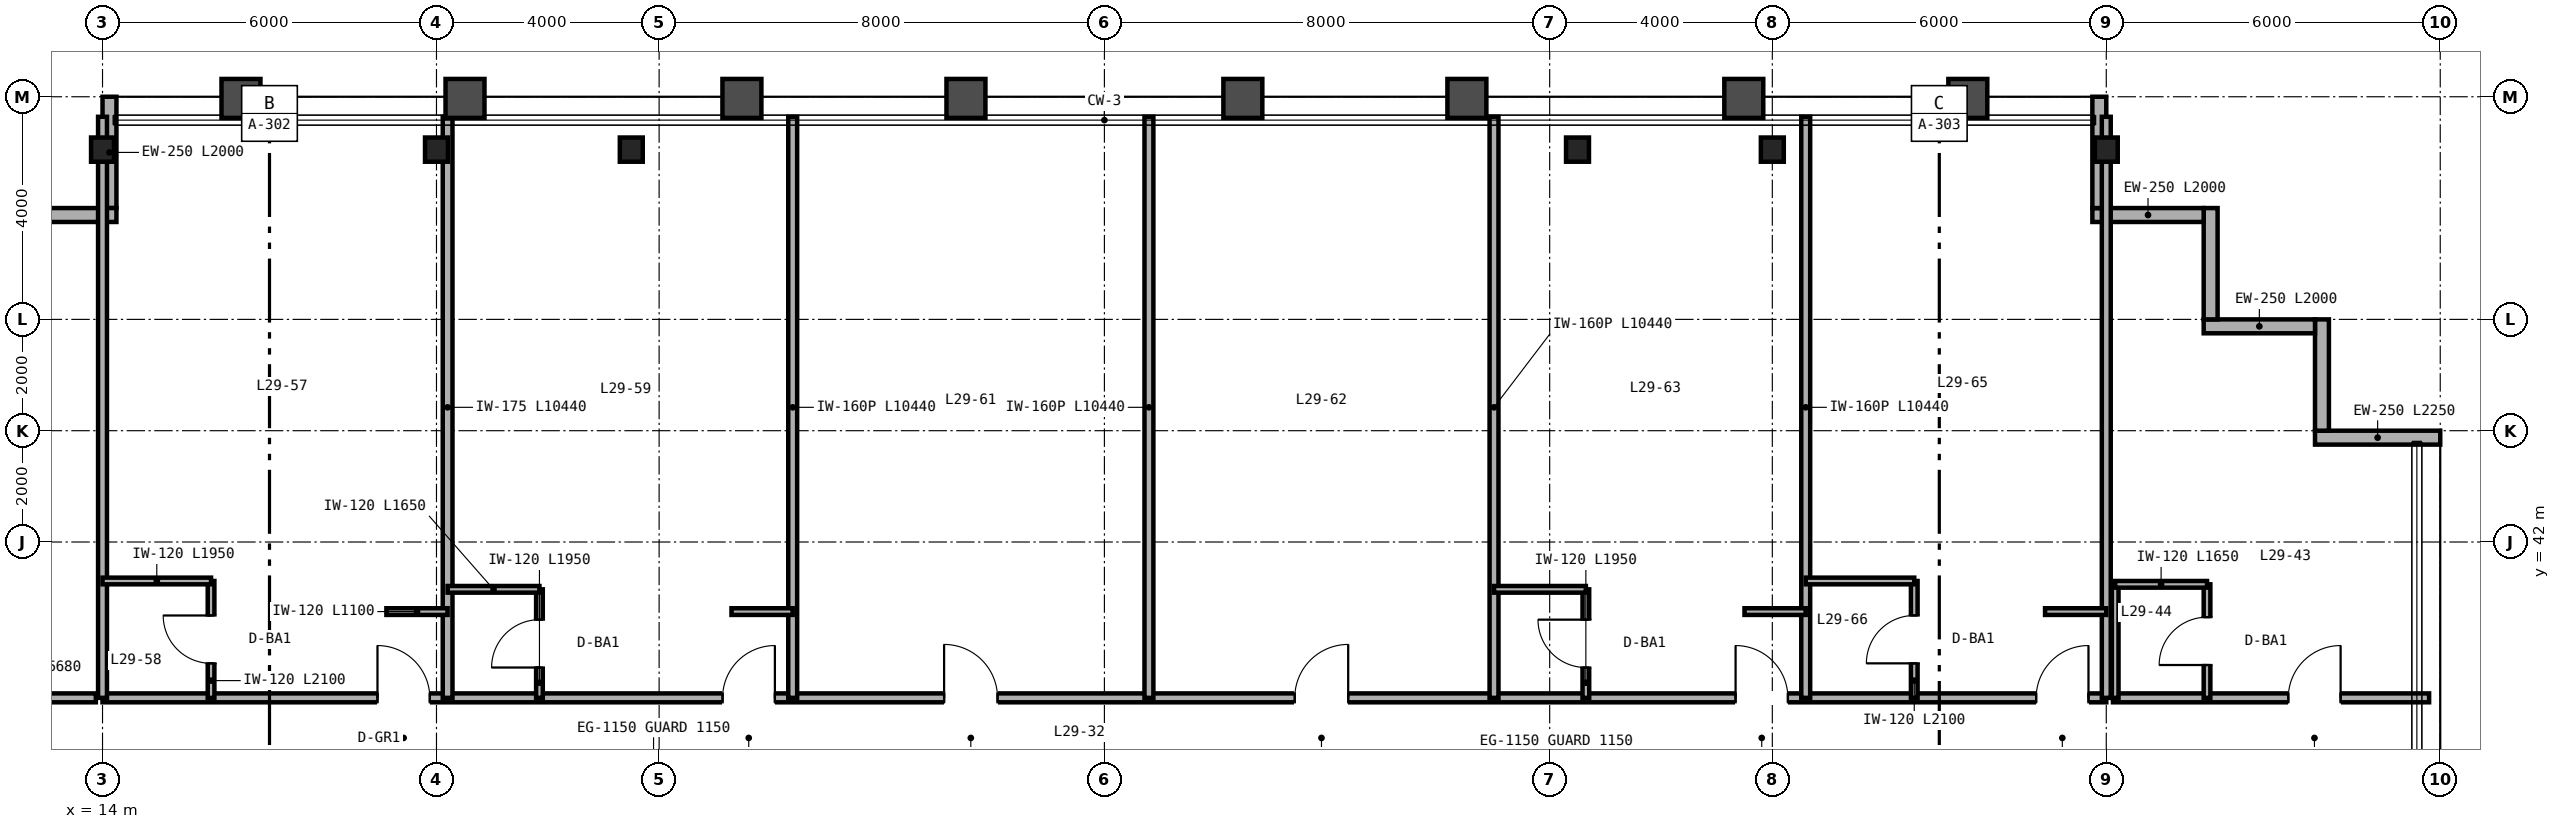
"""IFC4 building model, lengths in metres.
Left out: names, types, materials, properties, quantities, classifications, styles, units other than length and angle.
Written with IfcOpenShell. Run it as: python <this file> out.ifc"""

import sys

from ifc_helpers import new_model, si_unit, direction, frame, frame_2d, origin, origin_2d, place, context, subcontext, project, spatial, rectangle, i_section, extrude, source, transform, mapped, element, fill, save


model = new_model("IFC4")
c1 = context("Model", 3, precision=1e-05, world=origin(), true_north=direction((0.0, 1.0)))
c2 = subcontext(c1, "Body", "Model", "MODEL_VIEW")
j1 = project(units=[si_unit("LENGTHUNIT", "METRE"), si_unit("PLANEANGLEUNIT", "RADIAN")], contexts=[c1])
p1 = place(None, origin())
s1 = spatial("IfcSite", under=j1, at=p1, CompositionType="ELEMENT")
p2 = place(p1, origin())
s2 = spatial("IfcBuilding", under=s1, at=p2, CompositionType="ELEMENT")
p3 = place(p2, frame((0.0, 0.0, 118.8)))
s3 = spatial("IfcBuildingStorey", under=s2, at=p3, CompositionType="ELEMENT", Elevation=118.8)
m1 = source(origin(), c2, "Body", "SweptSolid", [
    extrude(i_section(OverallWidth=0.412, OverallDepth=0.435, WebThickness=0.036, FlangeThickness=0.057, FilletRadius=0.025, at=origin_2d()), origin(), (0.0, 0.0, 1.0), 3.36),
])
for number, where, z_axis, x_axis in (
    (1, (14.0, 49.05, 0.0), (0.0, 0.0, 1.0), (1.0, 0.0, 0.0)),
    (2, (20.0, 49.05, 0.0), (0.0, 0.0, 1.0), (1.0, 0.0, 0.0)),
    (3, (23.5, 49.05, 0.0), (0.0, 0.0, 1.0), (1.0, 0.0, 0.0)),
    (4, (40.5, 49.05, 0.0), (0.0, 0.0, 1.0), (1.0, 0.0, 0.0)),
    (5, (44.0, 49.05, 0.0), (0.0, 0.0, 1.0), (1.0, 0.0, 0.0)),
    (6, (50.0, 49.05, 0.0), (0.0, 0.0, 1.0), (1.0, 0.0, 0.0)),
):
    element("IfcColumn", number, at=place(p3, frame(where, z_axis=z_axis, x_axis=x_axis)), inside=s3, PredefinedType="COLUMN", context=c2, shape_type="MappedRepresentation", body=[
        mapped(m1, transform((0.0, 0.0, 0.0), scale=1.0)),
    ])
p4 = place(p3, frame((56.0, 43.875, 0.0), z_axis=(0.0, 0.0, 1.0), x_axis=(-1.0, 0.0, 0.0)))
e7 = element("IfcWall", 7, at=p4, inside=s3, PredefinedType="SOLIDWALL", context=c2, shape_type="SweptSolid", body=[
    extrude(rectangle(XDim=2.25, YDim=0.25, at=frame_2d((1.125, 0.0))), origin(), (0.0, 0.0, 1.0), 3.36),
])
for number, where, z_axis, x_axis in (
    (8, (53.875, 44.0, 0.0), (0.0, 0.0, 1.0), (0.0, 1.0, 0.0)),
    (9, (53.75, 45.875, 0.0), (0.0, 0.0, 1.0), (-1.0, 0.0, 0.0)),
    (10, (51.875, 46.0, 0.0), (0.0, 0.0, 1.0), (0.0, 1.0, 0.0)),
    (11, (51.75, 47.875, 0.0), (0.0, 0.0, 1.0), (-1.0, 0.0, 0.0)),
):
    element("IfcWall", number, at=place(p3, frame(where, z_axis=z_axis, x_axis=x_axis)), inside=s3, PredefinedType="SOLIDWALL", context=c2, shape_type="SweptSolid", body=[
        extrude(rectangle(XDim=2.0, YDim=0.25, at=frame_2d((1.0, 0.0))), origin(), (0.0, 0.0, 1.0), 3.36),
    ])
for number, where, z_axis, x_axis in (
    (12, (49.875, 48.0, 0.0), (0.0, 0.0, 1.0), (0.0, 1.0, 0.0)),
    (13, (14.125, 50.0, 0.0), (0.0, 0.0, 1.0), (0.0, -1.0, 0.0)),
):
    element("IfcWall", number, at=place(p3, frame(where, z_axis=z_axis, x_axis=x_axis)), inside=s3, PredefinedType="SOLIDWALL", context=c2, shape_type="SweptSolid", body=[
        extrude(rectangle(XDim=2.0, YDim=0.25, at=frame_2d((1.0, 0.0))), origin(), (0.0, 0.0, 1.0), 2.667),
    ])
p5 = place(p3, frame((14.25, 47.875, 0.0), z_axis=(0.0, 0.0, 1.0), x_axis=(-1.0, 0.0, 0.0)))
e14 = element("IfcWall", 14, at=p5, inside=s3, PredefinedType="SOLIDWALL", context=c2, shape_type="SweptSolid", body=[
    extrude(rectangle(XDim=2.0, YDim=0.25, at=frame_2d((1.0, 0.0))), origin(), (0.0, 0.0, 1.0), 3.36),
])
p6 = place(p3, frame((8.2, 39.2, 0.0), z_axis=(0.0, 0.0, 1.0), x_axis=(1.0, 0.0, 0.0)))
e15 = element("IfcWall", 15, at=p6, inside=s3, PredefinedType="PARTITIONING", context=c2, shape_type="SweptSolid", body=[
    extrude(rectangle(XDim=5.68, YDim=0.16, at=frame_2d((2.84, 0.0))), origin(), (0.0, 0.0, 1.0), 3.36),
])
p7 = place(p6, frame((2.36, 0.0, 0.0)))
e16 = element("IfcOpeningElement", 16, at=p7, cuts=e15, PredefinedType="OPENING", context=c2, shape_type="SweptSolid", body=[
    extrude(rectangle(XDim=0.96, YDim=2.15, at=frame_2d((0.48, 1.075))), frame((0.0, 0.09, 0.0), z_axis=(0.0, -1.0, 0.0), x_axis=(1.0, 0.0, 0.0)), (0.0, 0.0, 1.0), 0.18),
])
p8 = place(p3, frame((50.12, 39.2, 0.0), z_axis=(0.0, 0.0, 1.0), x_axis=(1.0, 0.0, 0.0)))
e17 = element("IfcWall", 17, at=p8, inside=s3, PredefinedType="PARTITIONING", context=c2, shape_type="SweptSolid", body=[
    extrude(rectangle(XDim=5.68, YDim=0.16, at=frame_2d((2.84, 0.0))), origin(), (0.0, 0.0, 1.0), 3.36),
])
p9 = place(p8, frame((3.15, 0.0, 0.0)))
e18 = element("IfcOpeningElement", 18, at=p9, cuts=e17, PredefinedType="OPENING", context=c2, shape_type="SweptSolid", body=[
    extrude(rectangle(XDim=0.94, YDim=2.15, at=frame_2d((0.47, 1.075))), frame((0.0, 0.09, 0.0), z_axis=(0.0, -1.0, 0.0), x_axis=(1.0, 0.0, 0.0)), (0.0, 0.0, 1.0), 0.18),
])
p10 = place(p3, frame((51.81, 39.2, 0.0), z_axis=(0.0, 0.0, 1.0), x_axis=(0.0, 1.0, 0.0)))
e19 = element("IfcWall", 19, at=p10, inside=s3, PredefinedType="PARTITIONING", context=c2, shape_type="SweptSolid", body=[
    extrude(rectangle(XDim=2.04, YDim=0.12, at=frame_2d((1.02, 0.0))), origin(), (0.0, 0.0, 1.0), 3.36),
])
p11 = place(p10, frame((0.59, 0.0, 0.0)))
e20 = element("IfcOpeningElement", 20, at=p11, cuts=e19, PredefinedType="OPENING", context=c2, shape_type="SweptSolid", body=[
    extrude(rectangle(XDim=0.86, YDim=2.1, at=frame_2d((0.43, 1.05))), frame((0.0, 0.07, 0.0), z_axis=(0.0, -1.0, 0.0), x_axis=(1.0, 0.0, 0.0)), (0.0, 0.0, 1.0), 0.14),
])
p12 = place(p3, frame((50.16, 39.2, 0.0), z_axis=(0.0, 0.0, 1.0), x_axis=(0.0, 1.0, 0.0)))
e21 = element("IfcWall", 21, at=p12, inside=s3, PredefinedType="PARTITIONING", context=c2, shape_type="SweptSolid", body=[
    extrude(rectangle(XDim=2.04, YDim=0.12, at=frame_2d((1.02, 0.0))), origin(), (0.0, 0.0, 1.0), 3.36),
])
p13 = place(p3, frame((50.16, 41.24, 0.0), z_axis=(0.0, 0.0, 1.0), x_axis=(1.0, 0.0, 0.0)))
e22 = element("IfcWall", 22, at=p13, inside=s3, PredefinedType="PARTITIONING", context=c2, shape_type="SweptSolid", body=[
    extrude(rectangle(XDim=1.65, YDim=0.12, at=frame_2d((0.825, 0.0))), origin(), (0.0, 0.0, 1.0), 3.36),
])
p14 = place(p3, frame((14.0, 39.2, 0.0), z_axis=(0.0, 0.0, 1.0), x_axis=(1.0, 0.0, 0.0)))
e23 = element("IfcWall", 23, at=p14, inside=s3, PredefinedType="PARTITIONING", context=c2, shape_type="SweptSolid", body=[
    extrude(rectangle(XDim=36.0, YDim=0.16, at=frame_2d((18.0, 0.0))), origin(), (0.0, 0.0, 1.0), 2.581),
])
p15 = place(p14, frame((4.94, 0.0, 0.0)))
e24 = element("IfcOpeningElement", 24, at=p15, cuts=e23, PredefinedType="OPENING", context=c2, shape_type="SweptSolid", body=[
    extrude(rectangle(XDim=0.94, YDim=2.15, at=frame_2d((0.47, 1.075))), frame((0.0, 0.09, 0.0), z_axis=(0.0, -1.0, 0.0), x_axis=(1.0, 0.0, 0.0)), (0.0, 0.0, 1.0), 0.18),
])
p16 = place(p14, frame((11.14, 0.0, 0.0)))
e25 = element("IfcOpeningElement", 25, at=p16, cuts=e23, PredefinedType="OPENING", context=c2, shape_type="SweptSolid", body=[
    extrude(rectangle(XDim=0.94, YDim=2.15, at=frame_2d((0.47, 1.075))), frame((0.0, 0.09, 0.0), z_axis=(0.0, -1.0, 0.0), x_axis=(1.0, 0.0, 0.0)), (0.0, 0.0, 1.0), 0.18),
])
p17 = place(p14, frame((15.12, 0.0, 0.0)))
e26 = element("IfcOpeningElement", 26, at=p17, cuts=e23, PredefinedType="OPENING", context=c2, shape_type="SweptSolid", body=[
    extrude(rectangle(XDim=0.96, YDim=2.15, at=frame_2d((0.48, 1.075))), frame((0.0, 0.09, 0.0), z_axis=(0.0, -1.0, 0.0), x_axis=(1.0, 0.0, 0.0)), (0.0, 0.0, 1.0), 0.18),
])
p18 = place(p14, frame((21.42, 0.0, 0.0)))
e27 = element("IfcOpeningElement", 27, at=p18, cuts=e23, PredefinedType="OPENING", context=c2, shape_type="SweptSolid", body=[
    extrude(rectangle(XDim=0.96, YDim=2.15, at=frame_2d((0.48, 1.075))), frame((0.0, 0.09, 0.0), z_axis=(0.0, -1.0, 0.0), x_axis=(1.0, 0.0, 0.0)), (0.0, 0.0, 1.0), 0.18),
])
p19 = place(p14, frame((29.34, 0.0, 0.0)))
e28 = element("IfcOpeningElement", 28, at=p19, cuts=e23, PredefinedType="OPENING", context=c2, shape_type="SweptSolid", body=[
    extrude(rectangle(XDim=0.94, YDim=2.15, at=frame_2d((0.47, 1.075))), frame((0.0, 0.09, 0.0), z_axis=(0.0, -1.0, 0.0), x_axis=(1.0, 0.0, 0.0)), (0.0, 0.0, 1.0), 0.18),
])
p20 = place(p14, frame((34.74, 0.0, 0.0)))
e29 = element("IfcOpeningElement", 29, at=p20, cuts=e23, PredefinedType="OPENING", context=c2, shape_type="SweptSolid", body=[
    extrude(rectangle(XDim=0.94, YDim=2.15, at=frame_2d((0.47, 1.075))), frame((0.0, 0.09, 0.0), z_axis=(0.0, -1.0, 0.0), x_axis=(1.0, 0.0, 0.0)), (0.0, 0.0, 1.0), 0.18),
])
for number, where, z_axis, x_axis in (
    (30, (14.0, 39.2, 0.0), (0.0, 0.0, 1.0), (0.0, 1.0, 0.0)),
    (31, (50.0, 39.2, 0.0), (0.0, 0.0, 1.0), (0.0, 1.0, 0.0)),
):
    element("IfcWall", number, at=place(p3, frame(where, z_axis=z_axis, x_axis=x_axis)), inside=s3, PredefinedType="PARTITIONING", context=c2, shape_type="SweptSolid", body=[
        extrude(rectangle(XDim=10.44, YDim=0.16, at=frame_2d((5.22, 0.0))), origin(), (0.0, 0.0, 1.0), 2.667),
    ])
p21 = place(p3, frame((20.2, 39.2, 0.0), z_axis=(0.0, 0.0, 1.0), x_axis=(0.0, 1.0, 0.0)))
e32 = element("IfcWall", 32, at=p21, inside=s3, PredefinedType="PARTITIONING", context=c2, shape_type="SweptSolid", body=[
    extrude(rectangle(XDim=10.44, YDim=0.175, at=frame_2d((5.22, 0.0))), origin(), (0.0, 0.0, 1.0), 2.667),
])
p22 = place(p3, frame((15.95, 39.2, 0.0), z_axis=(0.0, 0.0, 1.0), x_axis=(0.0, 1.0, 0.0)))
e33 = element("IfcWall", 33, at=p22, inside=s3, PredefinedType="PARTITIONING", context=c2, shape_type="SweptSolid", body=[
    extrude(rectangle(XDim=2.1, YDim=0.12, at=frame_2d((1.05, 0.0))), origin(), (0.0, 0.0, 1.0), 3.36),
])
p23 = place(p22, frame((0.62, 0.0, 0.0)))
e34 = element("IfcOpeningElement", 34, at=p23, cuts=e33, PredefinedType="OPENING", context=c2, shape_type="SweptSolid", body=[
    extrude(rectangle(XDim=0.86, YDim=2.1, at=frame_2d((0.43, 1.05))), frame((0.0, 0.07, 0.0), z_axis=(0.0, -1.0, 0.0), x_axis=(1.0, 0.0, 0.0)), (0.0, 0.0, 1.0), 0.14),
])
p24 = place(p3, frame((14.0, 41.3, 0.0), z_axis=(0.0, 0.0, 1.0), x_axis=(1.0, 0.0, 0.0)))
e35 = element("IfcWall", 35, at=p24, inside=s3, PredefinedType="PARTITIONING", context=c2, shape_type="SweptSolid", body=[
    extrude(rectangle(XDim=1.95, YDim=0.12, at=frame_2d((0.975, 0.0))), origin(), (0.0, 0.0, 1.0), 3.36),
])
p25 = place(p3, frame((19.1, 40.75, 0.0), z_axis=(0.0, 0.0, 1.0), x_axis=(1.0, 0.0, 0.0)))
e36 = element("IfcWall", 36, at=p25, inside=s3, PredefinedType="PARTITIONING", context=c2, shape_type="SweptSolid", body=[
    extrude(rectangle(XDim=1.1, YDim=0.12, at=frame_2d((0.55, 0.0))), origin(), (0.0, 0.0, 1.0), 3.36),
])
p26 = place(p3, frame((26.4, 39.2, 0.0), z_axis=(0.0, 0.0, 1.0), x_axis=(0.0, 1.0, 0.0)))
e37 = element("IfcWall", 37, at=p26, inside=s3, PredefinedType="PARTITIONING", context=c2, shape_type="SweptSolid", body=[
    extrude(rectangle(XDim=10.44, YDim=0.16, at=frame_2d((5.22, 0.0))), origin(), (0.0, 0.0, 1.0), 2.433),
])
p27 = place(p3, frame((21.85, 39.2, 0.0), z_axis=(0.0, 0.0, 1.0), x_axis=(0.0, 1.0, 0.0)))
e38 = element("IfcWall", 38, at=p27, inside=s3, PredefinedType="PARTITIONING", context=c2, shape_type="SweptSolid", body=[
    extrude(rectangle(XDim=1.95, YDim=0.12, at=frame_2d((0.975, 0.0))), origin(), (0.0, 0.0, 1.0), 3.36),
])
p28 = place(p27, frame((0.545, 0.0, 0.0)))
e39 = element("IfcOpeningElement", 39, at=p28, cuts=e38, PredefinedType="OPENING", context=c2, shape_type="SweptSolid", body=[
    extrude(rectangle(XDim=0.86, YDim=2.1, at=frame_2d((0.43, 1.05))), frame((0.0, 0.07, 0.0), z_axis=(0.0, -1.0, 0.0), x_axis=(1.0, 0.0, 0.0)), (0.0, 0.0, 1.0), 0.14),
])
p29 = place(p3, frame((20.2, 41.15, 0.0), z_axis=(0.0, 0.0, 1.0), x_axis=(1.0, 0.0, 0.0)))
e40 = element("IfcWall", 40, at=p29, inside=s3, PredefinedType="PARTITIONING", context=c2, shape_type="SweptSolid", body=[
    extrude(rectangle(XDim=1.65, YDim=0.12, at=frame_2d((0.825, 0.0))), origin(), (0.0, 0.0, 1.0), 3.36),
])
p30 = place(p3, frame((25.3, 40.75, 0.0), z_axis=(0.0, 0.0, 1.0), x_axis=(1.0, 0.0, 0.0)))
e41 = element("IfcWall", 41, at=p30, inside=s3, PredefinedType="PARTITIONING", context=c2, shape_type="SweptSolid", body=[
    extrude(rectangle(XDim=1.1, YDim=0.12, at=frame_2d((0.55, 0.0))), origin(), (0.0, 0.0, 1.0), 3.36),
])
for number, where, z_axis, x_axis in (
    (42, (32.8, 39.2, 0.0), (0.0, 0.0, 1.0), (0.0, 1.0, 0.0)),
    (43, (39.0, 39.2, 0.0), (0.0, 0.0, 1.0), (0.0, 1.0, 0.0)),
):
    element("IfcWall", number, at=place(p3, frame(where, z_axis=z_axis, x_axis=x_axis)), inside=s3, PredefinedType="PARTITIONING", context=c2, shape_type="SweptSolid", body=[
        extrude(rectangle(XDim=10.44, YDim=0.16, at=frame_2d((5.22, 0.0))), origin(), (0.0, 0.0, 1.0), 2.433),
    ])
p31 = place(p3, frame((44.6, 39.2, 0.0), z_axis=(0.0, 0.0, 1.0), x_axis=(0.0, 1.0, 0.0)))
e44 = element("IfcWall", 44, at=p31, inside=s3, PredefinedType="PARTITIONING", context=c2, shape_type="SweptSolid", body=[
    extrude(rectangle(XDim=10.44, YDim=0.16, at=frame_2d((5.22, 0.0))), origin(), (0.0, 0.0, 1.0), 2.667),
])
p32 = place(p3, frame((40.65, 39.2, 0.0), z_axis=(0.0, 0.0, 1.0), x_axis=(0.0, 1.0, 0.0)))
e45 = element("IfcWall", 45, at=p32, inside=s3, PredefinedType="PARTITIONING", context=c2, shape_type="SweptSolid", body=[
    extrude(rectangle(XDim=1.95, YDim=0.12, at=frame_2d((0.975, 0.0))), origin(), (0.0, 0.0, 1.0), 2.581),
])
p33 = place(p32, frame((0.545, 0.0, 0.0)))
e46 = element("IfcOpeningElement", 46, at=p33, cuts=e45, PredefinedType="OPENING", context=c2, shape_type="SweptSolid", body=[
    extrude(rectangle(XDim=0.86, YDim=2.1, at=frame_2d((0.43, 1.05))), frame((0.0, 0.07, 0.0), z_axis=(0.0, -1.0, 0.0), x_axis=(1.0, 0.0, 0.0)), (0.0, 0.0, 1.0), 0.14),
])
p34 = place(p3, frame((39.0, 41.15, 0.0), z_axis=(0.0, 0.0, 1.0), x_axis=(1.0, 0.0, 0.0)))
e47 = element("IfcWall", 47, at=p34, inside=s3, PredefinedType="PARTITIONING", context=c2, shape_type="SweptSolid", body=[
    extrude(rectangle(XDim=1.65, YDim=0.12, at=frame_2d((0.825, 0.0))), origin(), (0.0, 0.0, 1.0), 2.581),
])
p35 = place(p3, frame((43.5, 40.75, 0.0), z_axis=(0.0, 0.0, 1.0), x_axis=(1.0, 0.0, 0.0)))
e48 = element("IfcWall", 48, at=p35, inside=s3, PredefinedType="PARTITIONING", context=c2, shape_type="SweptSolid", body=[
    extrude(rectangle(XDim=1.1, YDim=0.12, at=frame_2d((0.55, 0.0))), origin(), (0.0, 0.0, 1.0), 3.36),
])
p36 = place(p3, frame((46.55, 39.2, 0.0), z_axis=(0.0, 0.0, 1.0), x_axis=(0.0, 1.0, 0.0)))
e49 = element("IfcWall", 49, at=p36, inside=s3, PredefinedType="PARTITIONING", context=c2, shape_type="SweptSolid", body=[
    extrude(rectangle(XDim=2.1, YDim=0.12, at=frame_2d((1.05, 0.0))), origin(), (0.0, 0.0, 1.0), 3.36),
])
p37 = place(p36, frame((0.62, 0.0, 0.0)))
e50 = element("IfcOpeningElement", 50, at=p37, cuts=e49, PredefinedType="OPENING", context=c2, shape_type="SweptSolid", body=[
    extrude(rectangle(XDim=0.86, YDim=2.1, at=frame_2d((0.43, 1.05))), frame((0.0, 0.07, 0.0), z_axis=(0.0, -1.0, 0.0), x_axis=(1.0, 0.0, 0.0)), (0.0, 0.0, 1.0), 0.14),
])
p38 = place(p3, frame((44.6, 41.3, 0.0), z_axis=(0.0, 0.0, 1.0), x_axis=(1.0, 0.0, 0.0)))
e51 = element("IfcWall", 51, at=p38, inside=s3, PredefinedType="PARTITIONING", context=c2, shape_type="SweptSolid", body=[
    extrude(rectangle(XDim=1.95, YDim=0.12, at=frame_2d((0.975, 0.0))), origin(), (0.0, 0.0, 1.0), 3.36),
])
p39 = place(p3, frame((48.9, 40.75, 0.0), z_axis=(0.0, 0.0, 1.0), x_axis=(1.0, 0.0, 0.0)))
e52 = element("IfcWall", 52, at=p39, inside=s3, PredefinedType="PARTITIONING", context=c2, shape_type="SweptSolid", body=[
    extrude(rectangle(XDim=1.1, YDim=0.12, at=frame_2d((0.55, 0.0))), origin(), (0.0, 0.0, 1.0), 3.36),
])
m2 = source(origin(), c2, "Body", "SweptSolid", [
    extrude(rectangle(XDim=0.86, YDim=2.1, at=frame_2d((0.43, 1.05))), frame((0.0, 0.025, 0.0), z_axis=(0.0, -1.0, 0.0), x_axis=(1.0, 0.0, 0.0)), (0.0, 0.0, 1.0), 0.05),
])
p40 = place(p11, origin())
e53 = element("IfcDoor", 53, at=p40, inside=s3, OperationType="SINGLE_SWING_LEFT", PredefinedType="DOOR", context=c2, shape_type="MappedRepresentation", body=[
    mapped(m2, transform((0.0, 0.0, 0.0), scale=1.0)),
])
fill(e20, e53)
m3 = source(origin(), c2, "Body", "SweptSolid", [
    extrude(rectangle(XDim=0.94, YDim=2.15, at=frame_2d((0.47, 1.075))), frame((0.0, 0.025, 0.0), z_axis=(0.0, -1.0, 0.0), x_axis=(1.0, 0.0, 0.0)), (0.0, 0.0, 1.0), 0.05),
])
p41 = place(p9, origin())
e54 = element("IfcDoor", 54, at=p41, inside=s3, OperationType="SINGLE_SWING_RIGHT", PredefinedType="DOOR", context=c2, shape_type="MappedRepresentation", body=[
    mapped(m3, transform((0.0, 0.0, 0.0), scale=1.0)),
])
fill(e18, e54)
p42 = place(p23, origin())
e55 = element("IfcDoor", 55, at=p42, inside=s3, OperationType="SINGLE_SWING_RIGHT", PredefinedType="DOOR", context=c2, shape_type="MappedRepresentation", body=[
    mapped(m2, transform((0.0, 0.0, 0.0), scale=1.0)),
])
fill(e34, e55)
p43 = place(p28, origin())
e56 = element("IfcDoor", 56, at=p43, inside=s3, OperationType="SINGLE_SWING_LEFT", PredefinedType="DOOR", context=c2, shape_type="MappedRepresentation", body=[
    mapped(m2, transform((0.0, 0.0, 0.0), scale=1.0)),
])
fill(e39, e56)
p44 = place(p33, origin())
e57 = element("IfcDoor", 57, at=p44, inside=s3, OperationType="SINGLE_SWING_RIGHT", PredefinedType="DOOR", context=c2, shape_type="MappedRepresentation", body=[
    mapped(m2, transform((0.0, 0.0, 0.0), scale=1.0)),
])
fill(e46, e57)
p45 = place(p37, origin())
e58 = element("IfcDoor", 58, at=p45, inside=s3, OperationType="SINGLE_SWING_LEFT", PredefinedType="DOOR", context=c2, shape_type="MappedRepresentation", body=[
    mapped(m2, transform((0.0, 0.0, 0.0), scale=1.0)),
])
fill(e50, e58)
p46 = place(p15, origin())
e59 = element("IfcDoor", 59, at=p46, inside=s3, OperationType="SINGLE_SWING_LEFT", PredefinedType="DOOR", context=c2, shape_type="MappedRepresentation", body=[
    mapped(m3, transform((0.0, 0.0, 0.0), scale=1.0)),
])
fill(e24, e59)
p47 = place(p16, origin())
e60 = element("IfcDoor", 60, at=p47, inside=s3, OperationType="SINGLE_SWING_RIGHT", PredefinedType="DOOR", context=c2, shape_type="MappedRepresentation", body=[
    mapped(m3, transform((0.0, 0.0, 0.0), scale=1.0)),
])
fill(e25, e60)
m4 = source(origin(), c2, "Body", "SweptSolid", [
    extrude(rectangle(XDim=0.96, YDim=2.15, at=frame_2d((0.48, 1.075))), frame((0.0, 0.025, 0.0), z_axis=(0.0, -1.0, 0.0), x_axis=(1.0, 0.0, 0.0)), (0.0, 0.0, 1.0), 0.05),
])
p48 = place(p17, origin())
e61 = element("IfcDoor", 61, at=p48, inside=s3, OperationType="SINGLE_SWING_LEFT", PredefinedType="DOOR", context=c2, shape_type="MappedRepresentation", body=[
    mapped(m4, transform((0.0, 0.0, 0.0), scale=1.0)),
])
fill(e26, e61)
p49 = place(p18, origin())
e62 = element("IfcDoor", 62, at=p49, inside=s3, OperationType="SINGLE_SWING_RIGHT", PredefinedType="DOOR", context=c2, shape_type="MappedRepresentation", body=[
    mapped(m4, transform((0.0, 0.0, 0.0), scale=1.0)),
])
fill(e27, e62)
p50 = place(p19, origin())
e63 = element("IfcDoor", 63, at=p50, inside=s3, OperationType="SINGLE_SWING_LEFT", PredefinedType="DOOR", context=c2, shape_type="MappedRepresentation", body=[
    mapped(m3, transform((0.0, 0.0, 0.0), scale=1.0)),
])
fill(e28, e63)
p51 = place(p20, origin())
e64 = element("IfcDoor", 64, at=p51, inside=s3, OperationType="SINGLE_SWING_RIGHT", PredefinedType="DOOR", context=c2, shape_type="MappedRepresentation", body=[
    mapped(m3, transform((0.0, 0.0, 0.0), scale=1.0)),
])
fill(e29, e64)
save(model, sys.argv[1])
